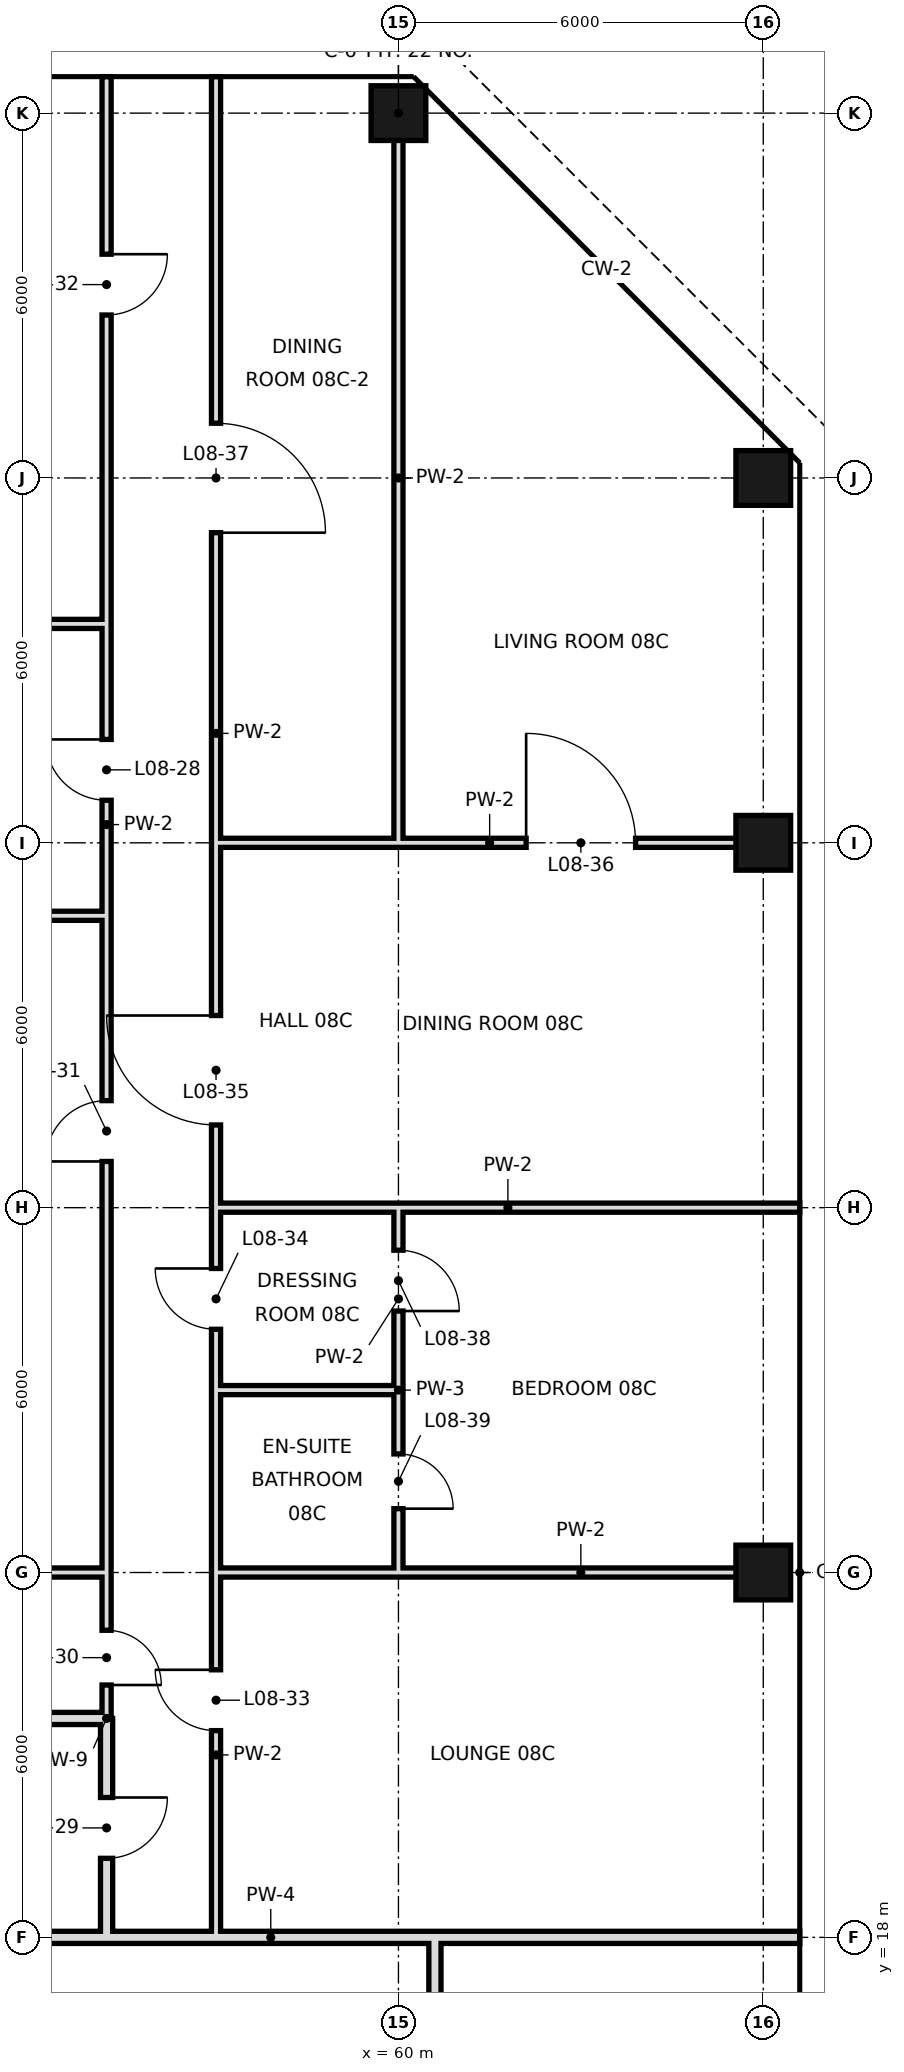
"""IFC4 building model, lengths in metres.
Left out: names, types, materials, properties, quantities, classifications, styles, units other than length and angle.
Written with IfcOpenShell. Run it as: python <this file> out.ifc"""

import sys

from ifc_helpers import new_model, si_unit, direction, frame, frame_2d, origin, origin_2d, place, context, subcontext, project, spatial, rectangle, hollow_rectangle, extrude, element, fill, save


model = new_model("IFC4")
c1 = context("Model", 3, precision=1e-05, world=origin(), true_north=direction((0.0, 1.0)))
c2 = subcontext(c1, "Body", "Model", "MODEL_VIEW")
j1 = project(units=[si_unit("LENGTHUNIT", "METRE"), si_unit("PLANEANGLEUNIT", "RADIAN")], contexts=[c1])
p1 = place(None, origin())
s1 = spatial("IfcSite", under=j1, at=p1, CompositionType="ELEMENT")
p2 = place(p1, origin())
s2 = spatial("IfcBuilding", under=s1, at=p2, CompositionType="ELEMENT")
p3 = place(p2, frame((0.0, 0.0, 49.8)))
s3 = spatial("IfcBuildingStorey", under=s2, at=p3, CompositionType="ELEMENT", Elevation=49.8)
for number, where, z_axis, x_axis in (
    (1, (60.0, 48.0, 0.0), (0.0, 0.0, 1.0), (1.0, 0.0, 0.0)),
    (2, (66.0, 24.0, 0.0), (0.0, 0.0, 1.0), (1.0, 0.0, 0.0)),
    (3, (66.0, 36.0, 0.0), (0.0, 0.0, 1.0), (1.0, 0.0, 0.0)),
    (4, (66.0, 42.0, 0.0), (0.0, 0.0, 1.0), (1.0, 0.0, 0.0)),
):
    element("IfcColumn", number, at=place(p3, frame(where, z_axis=z_axis, x_axis=x_axis)), inside=s3, PredefinedType="COLUMN", context=c2, shape_type="SweptSolid", body=[
        extrude(hollow_rectangle(XDim=0.9, YDim=0.9, WallThickness=0.045, at=origin_2d()), origin(), (0.0, 0.0, 1.0), 3.6),
    ])
p4 = place(p3, frame((55.2, 18.0, 0.0), z_axis=(0.0, 0.0, 1.0), x_axis=(0.0, 1.0, 0.0)))
e5 = element("IfcWall", 5, at=p4, inside=s3, PredefinedType="SOLIDWALL", context=c2, shape_type="SweptSolid", body=[
    extrude(rectangle(XDim=3.6, YDim=0.2, at=frame_2d((1.8, 0.0))), origin(), (0.0, 0.0, 1.0), 2.52),
])
p5 = place(p4, frame((1.3, 0.0, 0.0)))
e6 = element("IfcOpeningElement", 6, at=p5, cuts=e5, PredefinedType="OPENING", context=c2, shape_type="SweptSolid", body=[
    extrude(rectangle(XDim=1.0, YDim=2.4, at=frame_2d((0.5, 1.2))), frame((0.0, 0.11, 0.0), z_axis=(0.0, -1.0, 0.0), x_axis=(1.0, 0.0, 0.0)), (0.0, 0.0, 1.0), 0.22),
])
p6 = place(p3, frame((55.2, 24.0, 0.0), z_axis=(0.0, 0.0, 1.0), x_axis=(0.0, 1.0, 0.0)))
e7 = element("IfcWall", 7, at=p6, inside=s3, PredefinedType="PARTITIONING", context=c2, shape_type="SweptSolid", body=[
    extrude(rectangle(XDim=24.6, YDim=0.15, at=frame_2d((12.3, 0.0))), origin(), (0.0, 0.0, 1.0), 3.42),
])
p7 = place(p6, frame((12.7, 0.0, 0.0)))
e8 = element("IfcOpeningElement", 8, at=p7, cuts=e7, PredefinedType="OPENING", context=c2, shape_type="SweptSolid", body=[
    extrude(rectangle(XDim=1.0, YDim=2.4, at=frame_2d((0.5, 1.2))), frame((0.0, 0.085, 0.0), z_axis=(0.0, -1.0, 0.0), x_axis=(1.0, 0.0, 0.0)), (0.0, 0.0, 1.0), 0.17),
])
p8 = place(p6, frame((6.76, 0.0, 0.0)))
e9 = element("IfcOpeningElement", 9, at=p8, cuts=e7, PredefinedType="OPENING", context=c2, shape_type="SweptSolid", body=[
    extrude(rectangle(XDim=1.0, YDim=2.4, at=frame_2d((0.5, 1.2))), frame((0.0, 0.085, 0.0), z_axis=(0.0, -1.0, 0.0), x_axis=(1.0, 0.0, 0.0)), (0.0, 0.0, 1.0), 0.17),
])
p9 = place(p6, frame((20.68, 0.0, 0.0)))
e10 = element("IfcOpeningElement", 10, at=p9, cuts=e7, PredefinedType="OPENING", context=c2, shape_type="SweptSolid", body=[
    extrude(rectangle(XDim=1.0, YDim=2.4, at=frame_2d((0.5, 1.2))), frame((0.0, 0.085, 0.0), z_axis=(0.0, -1.0, 0.0), x_axis=(1.0, 0.0, 0.0)), (0.0, 0.0, 1.0), 0.17),
])
p10 = place(p3, frame((55.2, 21.6, 0.0), z_axis=(0.0, 0.0, 1.0), x_axis=(0.0, 1.0, 0.0)))
e11 = element("IfcWall", 11, at=p10, inside=s3, PredefinedType="PARTITIONING", context=c2, shape_type="SweptSolid", body=[
    extrude(rectangle(XDim=2.4, YDim=0.15, at=frame_2d((1.2, 0.0))), origin(), (0.0, 0.0, 1.0), 3.42),
])
p11 = place(p10, frame((0.55, 0.0, 0.0)))
e12 = element("IfcOpeningElement", 12, at=p11, cuts=e11, PredefinedType="OPENING", context=c2, shape_type="SweptSolid", body=[
    extrude(rectangle(XDim=0.9, YDim=2.4, at=frame_2d((0.45, 1.2))), frame((0.0, 0.085, 0.0), z_axis=(0.0, -1.0, 0.0), x_axis=(1.0, 0.0, 0.0)), (0.0, 0.0, 1.0), 0.17),
])
p12 = place(p3, frame((57.0, 18.0, 0.0), z_axis=(0.0, 0.0, 1.0), x_axis=(0.0, 1.0, 0.0)))
e13 = element("IfcWall", 13, at=p12, inside=s3, PredefinedType="PARTITIONING", context=c2, shape_type="SweptSolid", body=[
    extrude(rectangle(XDim=6.0, YDim=0.15, at=frame_2d((3.0, 0.0))), origin(), (0.0, 0.0, 1.0), 3.42),
])
p13 = place(p12, frame((3.4, 0.0, 0.0)))
e14 = element("IfcOpeningElement", 14, at=p13, cuts=e13, PredefinedType="OPENING", context=c2, shape_type="SweptSolid", body=[
    extrude(rectangle(XDim=1.0, YDim=2.4, at=frame_2d((0.5, 1.2))), frame((0.0, 0.085, 0.0), z_axis=(0.0, -1.0, 0.0), x_axis=(1.0, 0.0, 0.0)), (0.0, 0.0, 1.0), 0.17),
])
p14 = place(p3, frame((57.0, 27.0, 0.0), z_axis=(0.0, 0.0, 1.0), x_axis=(0.0, 1.0, 0.0)))
e15 = element("IfcWall", 15, at=p14, inside=s3, PredefinedType="PARTITIONING", context=c2, shape_type="SweptSolid", body=[
    extrude(rectangle(XDim=21.6, YDim=0.15, at=frame_2d((10.8, 0.0))), origin(), (0.0, 0.0, 1.0), 3.42),
])
p15 = place(p14, frame((1.0, 0.0, 0.0)))
e16 = element("IfcOpeningElement", 16, at=p15, cuts=e15, PredefinedType="OPENING", context=c2, shape_type="SweptSolid", body=[
    extrude(rectangle(XDim=1.0, YDim=2.4, at=frame_2d((0.5, 1.2))), frame((0.0, 0.085, 0.0), z_axis=(0.0, -1.0, 0.0), x_axis=(1.0, 0.0, 0.0)), (0.0, 0.0, 1.0), 0.17),
])
p16 = place(p14, frame((4.36, 0.0, 0.0)))
e17 = element("IfcOpeningElement", 17, at=p16, cuts=e15, PredefinedType="OPENING", context=c2, shape_type="SweptSolid", body=[
    extrude(rectangle(XDim=1.8, YDim=2.4, at=frame_2d((0.9, 1.2))), frame((0.0, 0.085, 0.0), z_axis=(0.0, -1.0, 0.0), x_axis=(1.0, 0.0, 0.0)), (0.0, 0.0, 1.0), 0.17),
])
p17 = place(p14, frame((14.1, 0.0, 0.0)))
e18 = element("IfcOpeningElement", 18, at=p17, cuts=e15, PredefinedType="OPENING", context=c2, shape_type="SweptSolid", body=[
    extrude(rectangle(XDim=1.8, YDim=2.4, at=frame_2d((0.9, 1.2))), frame((0.0, 0.085, 0.0), z_axis=(0.0, -1.0, 0.0), x_axis=(1.0, 0.0, 0.0)), (0.0, 0.0, 1.0), 0.17),
])
p18 = place(p3, frame((57.0, 24.0, 0.0), z_axis=(0.0, 0.0, 1.0), x_axis=(0.0, 1.0, 0.0)))
e19 = element("IfcWall", 19, at=p18, inside=s3, PredefinedType="PARTITIONING", context=c2, shape_type="SweptSolid", body=[
    extrude(rectangle(XDim=3.0, YDim=0.15, at=frame_2d((1.5, 0.0))), origin(), (0.0, 0.0, 1.0), 3.42),
])
p19 = place(p3, frame((60.0, 27.0, 0.0), z_axis=(0.0, 0.0, 1.0), x_axis=(0.0, 1.0, 0.0)))
e20 = element("IfcWall", 20, at=p19, inside=s3, PredefinedType="PARTITIONING", context=c2, shape_type="SweptSolid", body=[
    extrude(rectangle(XDim=3.0, YDim=0.15, at=frame_2d((1.5, 0.0))), origin(), (0.0, 0.0, 1.0), 3.42),
])
p20 = place(p19, frame((1.3, 0.0, 0.0)))
e21 = element("IfcOpeningElement", 21, at=p20, cuts=e20, PredefinedType="OPENING", context=c2, shape_type="SweptSolid", body=[
    extrude(rectangle(XDim=1.0, YDim=2.4, at=frame_2d((0.5, 1.2))), frame((0.0, 0.085, 0.0), z_axis=(0.0, -1.0, 0.0), x_axis=(1.0, 0.0, 0.0)), (0.0, 0.0, 1.0), 0.17),
])
p21 = place(p3, frame((60.0, 36.0, 0.0), z_axis=(0.0, 0.0, 1.0), x_axis=(0.0, 1.0, 0.0)))
e22 = element("IfcWall", 22, at=p21, inside=s3, PredefinedType="PARTITIONING", context=c2, shape_type="SweptSolid", body=[
    extrude(rectangle(XDim=12.0, YDim=0.15, at=frame_2d((6.0, 0.0))), origin(), (0.0, 0.0, 1.0), 3.42),
])
p22 = place(p3, frame((60.0, 24.0, 0.0), z_axis=(0.0, 0.0, 1.0), x_axis=(0.0, 1.0, 0.0)))
e23 = element("IfcWall", 23, at=p22, inside=s3, PredefinedType="PARTITIONING", context=c2, shape_type="SweptSolid", body=[
    extrude(rectangle(XDim=3.0, YDim=0.15, at=frame_2d((1.5, 0.0))), origin(), (0.0, 0.0, 1.0), 3.42),
])
p23 = place(p22, frame((1.05, 0.0, 0.0)))
e24 = element("IfcOpeningElement", 24, at=p23, cuts=e23, PredefinedType="OPENING", context=c2, shape_type="SweptSolid", body=[
    extrude(rectangle(XDim=0.9, YDim=2.4, at=frame_2d((0.45, 1.2))), frame((0.0, 0.085, 0.0), z_axis=(0.0, -1.0, 0.0), x_axis=(1.0, 0.0, 0.0)), (0.0, 0.0, 1.0), 0.17),
])
p24 = place(p3, frame((60.6, 10.8, 0.0), z_axis=(0.0, 0.0, 1.0), x_axis=(0.0, 1.0, 0.0)))
e25 = element("IfcWall", 25, at=p24, inside=s3, PredefinedType="SOLIDWALL", context=c2, shape_type="SweptSolid", body=[
    extrude(rectangle(XDim=7.2, YDim=0.2, at=frame_2d((3.6, 0.0))), origin(), (0.0, 0.0, 1.0), 2.52),
])
p25 = place(p3, frame((44.9, 18.0, 0.0), z_axis=(0.0, 0.0, 1.0), x_axis=(1.0, 0.0, 0.0)))
e26 = element("IfcWall", 26, at=p25, inside=s3, PredefinedType="SOLIDWALL", context=c2, shape_type="SweptSolid", body=[
    extrude(rectangle(XDim=10.3, YDim=0.2, at=frame_2d((5.15, 0.0))), origin(), (0.0, 0.0, 1.0), 2.52),
])
p26 = place(p3, frame((60.6, 18.0, 0.0), z_axis=(0.0, 0.0, 1.0), x_axis=(1.0, 0.0, 0.0)))
e27 = element("IfcWall", 27, at=p26, inside=s3, PredefinedType="SOLIDWALL", context=c2, shape_type="SweptSolid", body=[
    extrude(rectangle(XDim=6.0, YDim=0.2, at=frame_2d((3.0, 0.0))), origin(), (0.0, 0.0, 1.0), 2.52),
])
p27 = place(p3, frame((55.2, 18.0, 0.0), z_axis=(0.0, 0.0, 1.0), x_axis=(1.0, 0.0, 0.0)))
e28 = element("IfcWall", 28, at=p27, inside=s3, PredefinedType="SOLIDWALL", context=c2, shape_type="SweptSolid", body=[
    extrude(rectangle(XDim=5.4, YDim=0.2, at=frame_2d((2.7, 0.0))), origin(), (0.0, 0.0, 1.0), 2.52),
])
p28 = place(p3, frame((44.9, 21.6, 0.0), z_axis=(0.0, 0.0, 1.0), x_axis=(1.0, 0.0, 0.0)))
e29 = element("IfcWall", 29, at=p28, inside=s3, PredefinedType="SOLIDWALL", context=c2, shape_type="SweptSolid", body=[
    extrude(rectangle(XDim=10.3, YDim=0.2, at=frame_2d((5.15, 0.0))), origin(), (0.0, 0.0, 1.0), 2.72),
])
p29 = place(p3, frame((60.0, 24.0, 0.0), z_axis=(0.0, 0.0, 1.0), x_axis=(1.0, 0.0, 0.0)))
e30 = element("IfcWall", 30, at=p29, inside=s3, PredefinedType="PARTITIONING", context=c2, shape_type="SweptSolid", body=[
    extrude(rectangle(XDim=6.0, YDim=0.15, at=frame_2d((3.0, 0.0))), origin(), (0.0, 0.0, 1.0), 2.52),
])
p30 = place(p3, frame((44.9, 24.0, 0.0), z_axis=(0.0, 0.0, 1.0), x_axis=(1.0, 0.0, 0.0)))
e31 = element("IfcWall", 31, at=p30, inside=s3, PredefinedType="PARTITIONING", context=c2, shape_type="SweptSolid", body=[
    extrude(rectangle(XDim=10.3, YDim=0.15, at=frame_2d((5.15, 0.0))), origin(), (0.0, 0.0, 1.0), 2.52),
])
p31 = place(p3, frame((57.0, 24.0, 0.0), z_axis=(0.0, 0.0, 1.0), x_axis=(1.0, 0.0, 0.0)))
e32 = element("IfcWall", 32, at=p31, inside=s3, PredefinedType="PARTITIONING", context=c2, shape_type="SweptSolid", body=[
    extrude(rectangle(XDim=3.0, YDim=0.15, at=frame_2d((1.5, 0.0))), origin(), (0.0, 0.0, 1.0), 2.52),
])
p32 = place(p3, frame((57.0, 27.0, 0.0), z_axis=(0.0, 0.0, 1.0), x_axis=(1.0, 0.0, 0.0)))
e33 = element("IfcWall", 33, at=p32, inside=s3, PredefinedType="PARTITIONING", context=c2, shape_type="SweptSolid", body=[
    extrude(rectangle(XDim=3.0, YDim=0.15, at=frame_2d((1.5, 0.0))), origin(), (0.0, 0.0, 1.0), 3.42),
])
p33 = place(p3, frame((57.0, 30.0, 0.0), z_axis=(0.0, 0.0, 1.0), x_axis=(1.0, 0.0, 0.0)))
e34 = element("IfcWall", 34, at=p33, inside=s3, PredefinedType="PARTITIONING", context=c2, shape_type="SweptSolid", body=[
    extrude(rectangle(XDim=9.6, YDim=0.15, at=frame_2d((4.8, 0.0))), origin(), (0.0, 0.0, 1.0), 2.52),
])
p34 = place(p3, frame((44.9, 34.8, 0.0), z_axis=(0.0, 0.0, 1.0), x_axis=(1.0, 0.0, 0.0)))
e35 = element("IfcWall", 35, at=p34, inside=s3, PredefinedType="PARTITIONING", context=c2, shape_type="SweptSolid", body=[
    extrude(rectangle(XDim=10.3, YDim=0.15, at=frame_2d((5.15, 0.0))), origin(), (0.0, 0.0, 1.0), 3.42),
])
p35 = place(p3, frame((57.0, 36.0, 0.0), z_axis=(0.0, 0.0, 1.0), x_axis=(1.0, 0.0, 0.0)))
e36 = element("IfcWall", 36, at=p35, inside=s3, PredefinedType="PARTITIONING", context=c2, shape_type="SweptSolid", body=[
    extrude(rectangle(XDim=9.0, YDim=0.15, at=frame_2d((4.5, 0.0))), origin(), (0.0, 0.0, 1.0), 2.52),
])
p36 = place(p35, frame((5.1, 0.0, 0.0)))
e37 = element("IfcOpeningElement", 37, at=p36, cuts=e36, PredefinedType="OPENING", context=c2, shape_type="SweptSolid", body=[
    extrude(rectangle(XDim=1.8, YDim=2.4, at=frame_2d((0.9, 1.2))), frame((0.0, 0.085, 0.0), z_axis=(0.0, -1.0, 0.0), x_axis=(1.0, 0.0, 0.0)), (0.0, 0.0, 1.0), 0.17),
])
p37 = place(p3, frame((44.9, 39.6, 0.0), z_axis=(0.0, 0.0, 1.0), x_axis=(1.0, 0.0, 0.0)))
e38 = element("IfcWall", 38, at=p37, inside=s3, PredefinedType="PARTITIONING", context=c2, shape_type="SweptSolid", body=[
    extrude(rectangle(XDim=10.3, YDim=0.15, at=frame_2d((5.15, 0.0))), origin(), (0.0, 0.0, 1.0), 3.42),
])
p38 = place(p7, frame((1.0, 0.0, 0.0), z_axis=(0.0, 0.0, 1.0), x_axis=(-1.0, 0.0, 0.0)))
e39 = element("IfcDoor", 39, at=p38, inside=s3, OperationType="SINGLE_SWING_LEFT", PredefinedType="DOOR", context=c2, shape_type="SweptSolid", body=[
    extrude(rectangle(XDim=1.0, YDim=2.4, at=frame_2d((0.5, 1.2))), frame((0.0, 0.025, 0.0), z_axis=(0.0, -1.0, 0.0), x_axis=(1.0, 0.0, 0.0)), (0.0, 0.0, 1.0), 0.05),
])
fill(e8, e39)
p39 = place(p5, origin())
e40 = element("IfcDoor", 40, at=p39, inside=s3, OperationType="SINGLE_SWING_RIGHT", PredefinedType="DOOR", context=c2, shape_type="SweptSolid", body=[
    extrude(rectangle(XDim=1.0, YDim=2.4, at=frame_2d((0.5, 1.2))), frame((0.0, 0.025, 0.0), z_axis=(0.0, -1.0, 0.0), x_axis=(1.0, 0.0, 0.0)), (0.0, 0.0, 1.0), 0.05),
])
fill(e6, e40)
p40 = place(p11, frame((0.9, 0.0, 0.0), z_axis=(0.0, 0.0, 1.0), x_axis=(-1.0, 0.0, 0.0)))
e41 = element("IfcDoor", 41, at=p40, inside=s3, OperationType="SINGLE_SWING_RIGHT", PredefinedType="DOOR", context=c2, shape_type="SweptSolid", body=[
    extrude(rectangle(XDim=0.9, YDim=2.4, at=frame_2d((0.45, 1.2))), frame((0.0, 0.025, 0.0), z_axis=(0.0, -1.0, 0.0), x_axis=(1.0, 0.0, 0.0)), (0.0, 0.0, 1.0), 0.05),
])
fill(e12, e41)
p41 = place(p8, origin())
e42 = element("IfcDoor", 42, at=p41, inside=s3, OperationType="SINGLE_SWING_LEFT", PredefinedType="DOOR", context=c2, shape_type="SweptSolid", body=[
    extrude(rectangle(XDim=1.0, YDim=2.4, at=frame_2d((0.5, 1.2))), frame((0.0, 0.025, 0.0), z_axis=(0.0, -1.0, 0.0), x_axis=(1.0, 0.0, 0.0)), (0.0, 0.0, 1.0), 0.05),
])
fill(e9, e42)
p42 = place(p9, origin())
e43 = element("IfcDoor", 43, at=p42, inside=s3, OperationType="SINGLE_SWING_RIGHT", PredefinedType="DOOR", context=c2, shape_type="SweptSolid", body=[
    extrude(rectangle(XDim=1.0, YDim=2.4, at=frame_2d((0.5, 1.2))), frame((0.0, 0.025, 0.0), z_axis=(0.0, -1.0, 0.0), x_axis=(1.0, 0.0, 0.0)), (0.0, 0.0, 1.0), 0.05),
])
fill(e10, e43)
p43 = place(p13, frame((1.0, 0.0, 0.0), z_axis=(0.0, 0.0, 1.0), x_axis=(-1.0, 0.0, 0.0)))
e44 = element("IfcDoor", 44, at=p43, inside=s3, OperationType="SINGLE_SWING_LEFT", PredefinedType="DOOR", context=c2, shape_type="SweptSolid", body=[
    extrude(rectangle(XDim=1.0, YDim=2.4, at=frame_2d((0.5, 1.2))), frame((0.0, 0.025, 0.0), z_axis=(0.0, -1.0, 0.0), x_axis=(1.0, 0.0, 0.0)), (0.0, 0.0, 1.0), 0.05),
])
fill(e14, e44)
p44 = place(p15, frame((1.0, 0.0, 0.0), z_axis=(0.0, 0.0, 1.0), x_axis=(-1.0, 0.0, 0.0)))
e45 = element("IfcDoor", 45, at=p44, inside=s3, OperationType="SINGLE_SWING_LEFT", PredefinedType="DOOR", context=c2, shape_type="SweptSolid", body=[
    extrude(rectangle(XDim=1.0, YDim=2.4, at=frame_2d((0.5, 1.2))), frame((0.0, 0.025, 0.0), z_axis=(0.0, -1.0, 0.0), x_axis=(1.0, 0.0, 0.0)), (0.0, 0.0, 1.0), 0.05),
])
fill(e16, e45)
p45 = place(p16, frame((1.8, 0.0, 0.0), z_axis=(0.0, 0.0, 1.0), x_axis=(-1.0, 0.0, 0.0)))
e46 = element("IfcDoor", 46, at=p45, inside=s3, OperationType="SINGLE_SWING_LEFT", PredefinedType="DOOR", context=c2, shape_type="SweptSolid", body=[
    extrude(rectangle(XDim=1.8, YDim=2.4, at=frame_2d((0.9, 1.2))), frame((0.0, 0.025, 0.0), z_axis=(0.0, -1.0, 0.0), x_axis=(1.0, 0.0, 0.0)), (0.0, 0.0, 1.0), 0.05),
])
fill(e17, e46)
p46 = place(p36, origin())
e47 = element("IfcDoor", 47, at=p46, inside=s3, OperationType="SINGLE_SWING_LEFT", PredefinedType="DOOR", context=c2, shape_type="SweptSolid", body=[
    extrude(rectangle(XDim=1.8, YDim=2.4, at=frame_2d((0.9, 1.2))), frame((0.0, 0.025, 0.0), z_axis=(0.0, -1.0, 0.0), x_axis=(1.0, 0.0, 0.0)), (0.0, 0.0, 1.0), 0.05),
])
fill(e37, e47)
p47 = place(p17, frame((1.8, 0.0, 0.0), z_axis=(0.0, 0.0, 1.0), x_axis=(-1.0, 0.0, 0.0)))
e48 = element("IfcDoor", 48, at=p47, inside=s3, OperationType="SINGLE_SWING_RIGHT", PredefinedType="DOOR", context=c2, shape_type="SweptSolid", body=[
    extrude(rectangle(XDim=1.8, YDim=2.4, at=frame_2d((0.9, 1.2))), frame((0.0, 0.025, 0.0), z_axis=(0.0, -1.0, 0.0), x_axis=(1.0, 0.0, 0.0)), (0.0, 0.0, 1.0), 0.05),
])
fill(e18, e48)
p48 = place(p20, frame((1.0, 0.0, 0.0), z_axis=(0.0, 0.0, 1.0), x_axis=(-1.0, 0.0, 0.0)))
e49 = element("IfcDoor", 49, at=p48, inside=s3, OperationType="SINGLE_SWING_RIGHT", PredefinedType="DOOR", context=c2, shape_type="SweptSolid", body=[
    extrude(rectangle(XDim=1.0, YDim=2.4, at=frame_2d((0.5, 1.2))), frame((0.0, 0.025, 0.0), z_axis=(0.0, -1.0, 0.0), x_axis=(1.0, 0.0, 0.0)), (0.0, 0.0, 1.0), 0.05),
])
fill(e21, e49)
p49 = place(p23, frame((0.9, 0.0, 0.0), z_axis=(0.0, 0.0, 1.0), x_axis=(-1.0, 0.0, 0.0)))
e50 = element("IfcDoor", 50, at=p49, inside=s3, OperationType="SINGLE_SWING_RIGHT", PredefinedType="DOOR", context=c2, shape_type="SweptSolid", body=[
    extrude(rectangle(XDim=0.9, YDim=2.4, at=frame_2d((0.45, 1.2))), frame((0.0, 0.025, 0.0), z_axis=(0.0, -1.0, 0.0), x_axis=(1.0, 0.0, 0.0)), (0.0, 0.0, 1.0), 0.05),
])
fill(e24, e50)
save(model, sys.argv[1])
